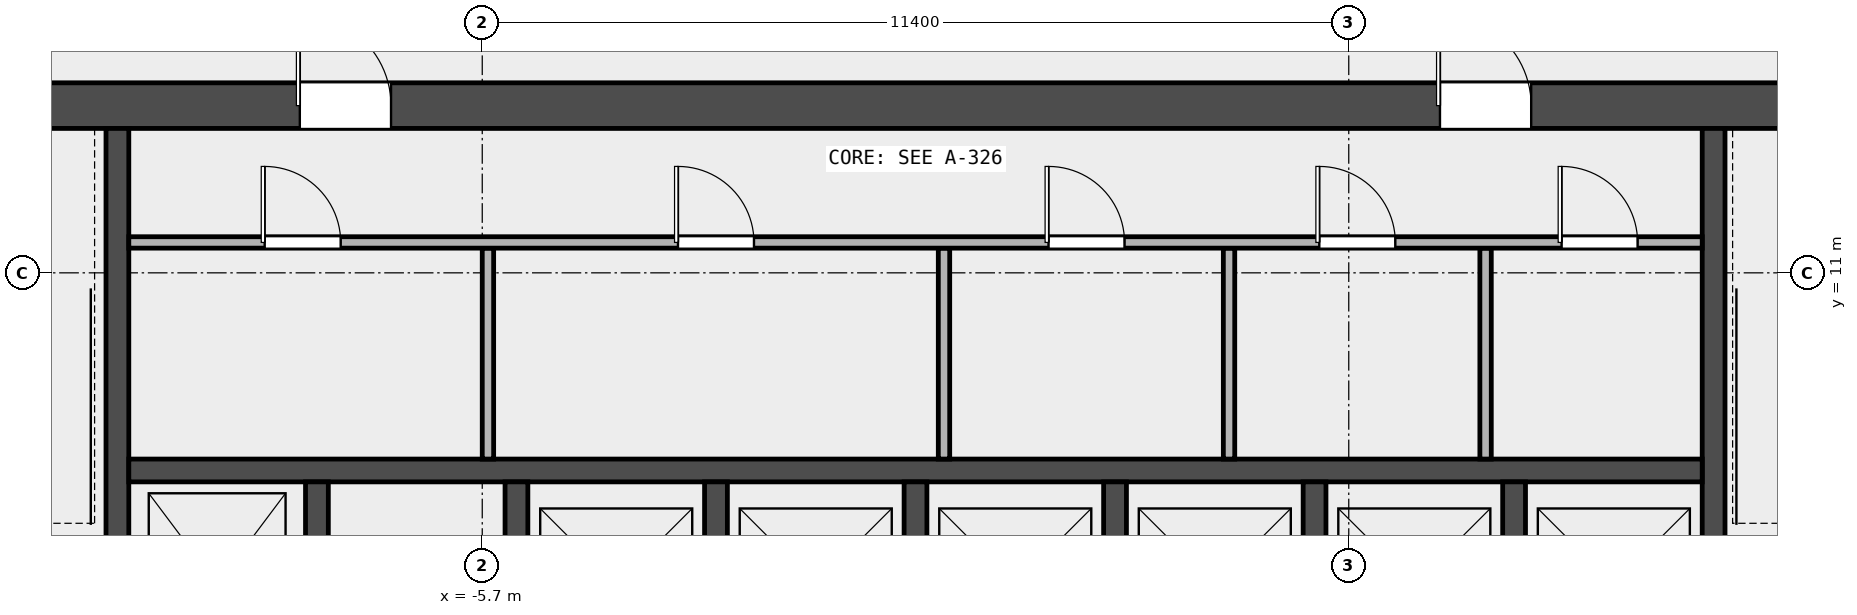
"""IFC4 building model, lengths in metres.
Left out: names, types, materials, properties, quantities, classifications, styles, units other than length and angle.
Written with IfcOpenShell. Run it as: python <this file> out.ifc"""

import sys

from ifc_helpers import new_model, si_unit, direction, frame, frame_2d, origin, place, context, subcontext, project, spatial, rectangle, extrude, element, fill, save


model = new_model("IFC4")
c1 = context("Model", 3, precision=1e-05, world=origin(), true_north=direction((0.0, 1.0)))
c2 = subcontext(c1, "Body", "Model", "MODEL_VIEW")
j1 = project(units=[si_unit("LENGTHUNIT", "METRE"), si_unit("PLANEANGLEUNIT", "RADIAN")], contexts=[c1])
p1 = place(None, origin())
s1 = spatial("IfcSite", under=j1, at=p1, CompositionType="ELEMENT")
p2 = place(p1, origin())
s2 = spatial("IfcBuilding", under=s1, at=p2, CompositionType="ELEMENT")
p3 = place(p2, frame((0.0, 0.0, 267.4)))
s3 = spatial("IfcBuildingStorey", under=s2, at=p3, CompositionType="ELEMENT", Elevation=267.4)
p4 = place(p3, frame((-14.4, 13.2, 0.0), z_axis=(0.0, 0.0, 1.0), x_axis=(1.0, 0.0, 0.0)))
e1 = element("IfcWall", 1, at=p4, inside=s3, PredefinedType="SHEAR", context=c2, shape_type="SweptSolid", body=[
    extrude(rectangle(XDim=28.8, YDim=0.6, at=frame_2d((14.4, 0.0))), origin(), (0.0, 0.0, 1.0), 3.7),
])
p5 = place(p4, frame((6.3, 0.0, 0.0)))
e2 = element("IfcOpeningElement", 2, at=p5, cuts=e1, PredefinedType="OPENING", context=c2, shape_type="SweptSolid", body=[
    extrude(rectangle(XDim=1.2, YDim=2.1, at=frame_2d((0.6, 1.05))), frame((0.0, 0.312, 0.0), z_axis=(0.0, -1.0, 0.0), x_axis=(1.0, 0.0, 0.0)), (0.0, 0.0, 1.0), 0.624),
])
p6 = place(p4, frame((21.3, 0.0, 0.0)))
e3 = element("IfcOpeningElement", 3, at=p6, cuts=e1, PredefinedType="OPENING", context=c2, shape_type="SweptSolid", body=[
    extrude(rectangle(XDim=1.2, YDim=2.1, at=frame_2d((0.6, 1.05))), frame((0.0, 0.312, 0.0), z_axis=(0.0, -1.0, 0.0), x_axis=(1.0, 0.0, 0.0)), (0.0, 0.0, 1.0), 0.624),
])
for number, where, z_axis, x_axis in (
    (4, (-10.5, 5.25, 0.0), (0.0, 0.0, 1.0), (0.0, 1.0, 0.0)),
    (5, (10.5, 5.25, 0.0), (0.0, 0.0, 1.0), (0.0, 1.0, 0.0)),
):
    element("IfcWall", number, at=place(p3, frame(where, z_axis=z_axis, x_axis=x_axis)), inside=s3, PredefinedType="SHEAR", context=c2, shape_type="SweptSolid", body=[
        extrude(rectangle(XDim=7.65, YDim=0.3, at=frame_2d((3.825, 0.0))), origin(), (0.0, 0.0, 1.0), 3.7),
    ])
p7 = place(p3, frame((-10.35, 8.4, 0.0), z_axis=(0.0, 0.0, 1.0), x_axis=(1.0, 0.0, 0.0)))
e6 = element("IfcWall", 6, at=p7, inside=s3, PredefinedType="SOLIDWALL", context=c2, shape_type="SweptSolid", body=[
    extrude(rectangle(XDim=20.7, YDim=0.3, at=frame_2d((10.35, 0.0))), origin(), (0.0, 0.0, 1.0), 3.7),
])
for number, where, z_axis, x_axis in (
    (7, (-7.875, 5.55, 0.0), (0.0, 0.0, 1.0), (0.0, 1.0, 0.0)),
    (8, (-5.25, 5.55, 0.0), (0.0, 0.0, 1.0), (0.0, 1.0, 0.0)),
    (9, (-2.625, 5.55, 0.0), (0.0, 0.0, 1.0), (0.0, 1.0, 0.0)),
    (10, (0.0, 5.55, 0.0), (0.0, 0.0, 1.0), (0.0, 1.0, 0.0)),
    (11, (2.625, 5.55, 0.0), (0.0, 0.0, 1.0), (0.0, 1.0, 0.0)),
    (12, (5.25, 5.55, 0.0), (0.0, 0.0, 1.0), (0.0, 1.0, 0.0)),
    (13, (7.875, 5.55, 0.0), (0.0, 0.0, 1.0), (0.0, 1.0, 0.0)),
):
    element("IfcWall", number, at=place(p3, frame(where, z_axis=z_axis, x_axis=x_axis)), inside=s3, PredefinedType="SOLIDWALL", context=c2, shape_type="SweptSolid", body=[
        extrude(rectangle(XDim=2.7, YDim=0.3, at=frame_2d((1.35, 0.0))), origin(), (0.0, 0.0, 1.0), 3.7),
    ])
for number, where, z_axis, x_axis in (
    (14, (-5.625, 8.55, 0.0), (0.0, 0.0, 1.0), (0.0, 1.0, 0.0)),
    (15, (0.375, 8.55, 0.0), (0.0, 0.0, 1.0), (0.0, 1.0, 0.0)),
    (16, (4.125, 8.55, 0.0), (0.0, 0.0, 1.0), (0.0, 1.0, 0.0)),
    (17, (7.5, 8.55, 0.0), (0.0, 0.0, 1.0), (0.0, 1.0, 0.0)),
):
    element("IfcWall", number, at=place(p3, frame(where, z_axis=z_axis, x_axis=x_axis)), inside=s3, PredefinedType="PARTITIONING", context=c2, shape_type="SweptSolid", body=[
        extrude(rectangle(XDim=2.775, YDim=0.15, at=frame_2d((1.387, 0.0))), origin(), (0.0, 0.0, 1.0), 3.7),
    ])
p8 = place(p3, frame((-10.35, 11.4, 0.0), z_axis=(0.0, 0.0, 1.0), x_axis=(1.0, 0.0, 0.0)))
e18 = element("IfcWall", 18, at=p8, inside=s3, PredefinedType="PARTITIONING", context=c2, shape_type="SweptSolid", body=[
    extrude(rectangle(XDim=20.7, YDim=0.15, at=frame_2d((10.35, 0.0))), origin(), (0.0, 0.0, 1.0), 3.7),
])
p9 = place(p8, frame((1.788, 0.0, 0.0)))
e19 = element("IfcOpeningElement", 19, at=p9, cuts=e18, PredefinedType="OPENING", context=c2, shape_type="SweptSolid", body=[
    extrude(rectangle(XDim=1.0, YDim=2.1, at=frame_2d((0.5, 1.05))), frame((0.0, 0.087, 0.0), z_axis=(0.0, -1.0, 0.0), x_axis=(1.0, 0.0, 0.0)), (0.0, 0.0, 1.0), 0.174),
])
p10 = place(p8, frame((7.225, 0.0, 0.0)))
e20 = element("IfcOpeningElement", 20, at=p10, cuts=e18, PredefinedType="OPENING", context=c2, shape_type="SweptSolid", body=[
    extrude(rectangle(XDim=1.0, YDim=2.1, at=frame_2d((0.5, 1.05))), frame((0.0, 0.087, 0.0), z_axis=(0.0, -1.0, 0.0), x_axis=(1.0, 0.0, 0.0)), (0.0, 0.0, 1.0), 0.174),
])
p11 = place(p8, frame((12.1, 0.0, 0.0)))
e21 = element("IfcOpeningElement", 21, at=p11, cuts=e18, PredefinedType="OPENING", context=c2, shape_type="SweptSolid", body=[
    extrude(rectangle(XDim=1.0, YDim=2.1, at=frame_2d((0.5, 1.05))), frame((0.0, 0.087, 0.0), z_axis=(0.0, -1.0, 0.0), x_axis=(1.0, 0.0, 0.0)), (0.0, 0.0, 1.0), 0.174),
])
p12 = place(p8, frame((15.663, 0.0, 0.0)))
e22 = element("IfcOpeningElement", 22, at=p12, cuts=e18, PredefinedType="OPENING", context=c2, shape_type="SweptSolid", body=[
    extrude(rectangle(XDim=1.0, YDim=2.1, at=frame_2d((0.5, 1.05))), frame((0.0, 0.087, 0.0), z_axis=(0.0, -1.0, 0.0), x_axis=(1.0, 0.0, 0.0)), (0.0, 0.0, 1.0), 0.174),
])
p13 = place(p8, frame((18.85, 0.0, 0.0)))
e23 = element("IfcOpeningElement", 23, at=p13, cuts=e18, PredefinedType="OPENING", context=c2, shape_type="SweptSolid", body=[
    extrude(rectangle(XDim=1.0, YDim=2.1, at=frame_2d((0.5, 1.05))), frame((0.0, 0.087, 0.0), z_axis=(0.0, -1.0, 0.0), x_axis=(1.0, 0.0, 0.0)), (0.0, 0.0, 1.0), 0.174),
])
p14 = place(p9, origin())
e24 = element("IfcDoor", 24, at=p14, inside=s3, OperationType="SINGLE_SWING_LEFT", PredefinedType="DOOR", context=c2, shape_type="SweptSolid", body=[
    extrude(rectangle(XDim=1.0, YDim=2.1, at=frame_2d((0.5, 1.05))), frame((0.0, 0.025, 0.0), z_axis=(0.0, -1.0, 0.0), x_axis=(1.0, 0.0, 0.0)), (0.0, 0.0, 1.0), 0.05),
])
fill(e19, e24)
p15 = place(p10, origin())
e25 = element("IfcDoor", 25, at=p15, inside=s3, OperationType="SINGLE_SWING_LEFT", PredefinedType="DOOR", context=c2, shape_type="SweptSolid", body=[
    extrude(rectangle(XDim=1.0, YDim=2.1, at=frame_2d((0.5, 1.05))), frame((0.0, 0.025, 0.0), z_axis=(0.0, -1.0, 0.0), x_axis=(1.0, 0.0, 0.0)), (0.0, 0.0, 1.0), 0.05),
])
fill(e20, e25)
p16 = place(p11, origin())
e26 = element("IfcDoor", 26, at=p16, inside=s3, OperationType="SINGLE_SWING_LEFT", PredefinedType="DOOR", context=c2, shape_type="SweptSolid", body=[
    extrude(rectangle(XDim=1.0, YDim=2.1, at=frame_2d((0.5, 1.05))), frame((0.0, 0.025, 0.0), z_axis=(0.0, -1.0, 0.0), x_axis=(1.0, 0.0, 0.0)), (0.0, 0.0, 1.0), 0.05),
])
fill(e21, e26)
p17 = place(p12, origin())
e27 = element("IfcDoor", 27, at=p17, inside=s3, OperationType="SINGLE_SWING_LEFT", PredefinedType="DOOR", context=c2, shape_type="SweptSolid", body=[
    extrude(rectangle(XDim=1.0, YDim=2.1, at=frame_2d((0.5, 1.05))), frame((0.0, 0.025, 0.0), z_axis=(0.0, -1.0, 0.0), x_axis=(1.0, 0.0, 0.0)), (0.0, 0.0, 1.0), 0.05),
])
fill(e22, e27)
p18 = place(p13, origin())
e28 = element("IfcDoor", 28, at=p18, inside=s3, OperationType="SINGLE_SWING_LEFT", PredefinedType="DOOR", context=c2, shape_type="SweptSolid", body=[
    extrude(rectangle(XDim=1.0, YDim=2.1, at=frame_2d((0.5, 1.05))), frame((0.0, 0.025, 0.0), z_axis=(0.0, -1.0, 0.0), x_axis=(1.0, 0.0, 0.0)), (0.0, 0.0, 1.0), 0.05),
])
fill(e23, e28)
p19 = place(p5, origin())
e29 = element("IfcDoor", 29, at=p19, inside=s3, OperationType="SINGLE_SWING_LEFT", PredefinedType="DOOR", context=c2, shape_type="SweptSolid", body=[
    extrude(rectangle(XDim=1.2, YDim=2.1, at=frame_2d((0.6, 1.05))), frame((0.0, 0.025, 0.0), z_axis=(0.0, -1.0, 0.0), x_axis=(1.0, 0.0, 0.0)), (0.0, 0.0, 1.0), 0.05),
])
fill(e2, e29)
p20 = place(p6, origin())
e30 = element("IfcDoor", 30, at=p20, inside=s3, OperationType="SINGLE_SWING_RIGHT", PredefinedType="DOOR", context=c2, shape_type="SweptSolid", body=[
    extrude(rectangle(XDim=1.2, YDim=2.1, at=frame_2d((0.6, 1.05))), frame((0.0, 0.025, 0.0), z_axis=(0.0, -1.0, 0.0), x_axis=(1.0, 0.0, 0.0)), (0.0, 0.0, 1.0), 0.05),
])
fill(e3, e30)
save(model, sys.argv[1])
